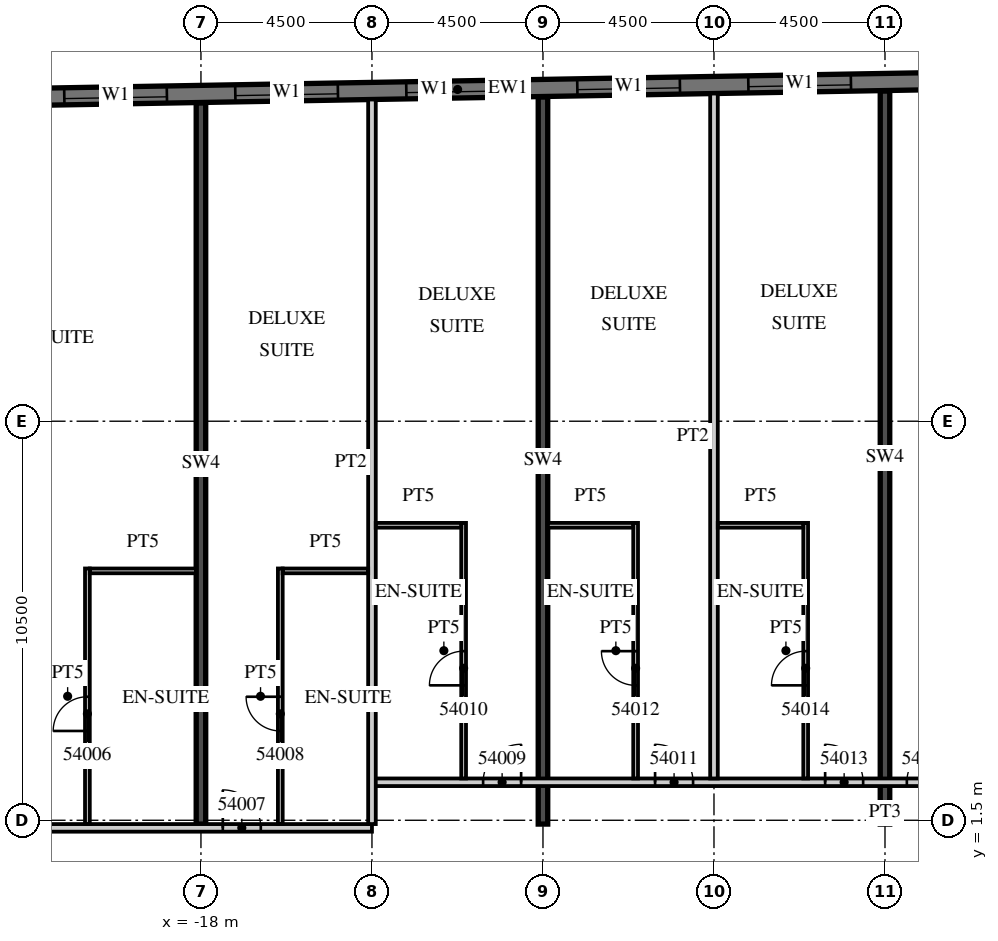
"""IFC4 building model, lengths in metres.
Left out: names, types, materials, properties, quantities, classifications, styles, units other than length and angle.
Written with IfcOpenShell. Run it as: python <this file> out.ifc"""

import sys

from ifc_helpers import new_model, si_unit, direction, frame, frame_2d, origin, place, context, subcontext, project, spatial, rectangle, extrude, element, fill, save


model = new_model("IFC4")
c1 = context("Model", 3, precision=1e-05, world=origin(), true_north=direction((0.0, 1.0)))
c2 = subcontext(c1, "Body", "Model", "MODEL_VIEW")
j1 = project(units=[si_unit("LENGTHUNIT", "METRE"), si_unit("PLANEANGLEUNIT", "RADIAN")], contexts=[c1])
p1 = place(None, origin())
s1 = spatial("IfcSite", under=j1, at=p1, CompositionType="ELEMENT")
p2 = place(p1, origin())
s2 = spatial("IfcBuilding", under=s1, at=p2, CompositionType="ELEMENT")
p3 = place(p2, frame((0.0, 0.0, 224.3)))
s3 = spatial("IfcBuildingStorey", under=s2, at=p3, CompositionType="ELEMENT", Elevation=224.3)
p4 = place(p3, frame((-18.0, 1.4, 0.0), z_axis=(0.0, 0.0, 1.0), x_axis=(0.0, 1.0, 0.0)))
e1 = element("IfcWall", 1, at=p4, inside=s3, PredefinedType="SHEAR", context=c2, shape_type="SweptSolid", body=[
    extrude(rectangle(XDim=18.974, YDim=0.25, at=frame_2d((9.487, 0.0))), origin(), (0.0, 0.0, 1.0), 3.3),
])
p5 = place(p3, frame((-9.0, 1.4, 0.0), z_axis=(0.0, 0.0, 1.0), x_axis=(0.0, 1.0, 0.0)))
e2 = element("IfcWall", 2, at=p5, inside=s3, PredefinedType="SHEAR", context=c2, shape_type="SweptSolid", body=[
    extrude(rectangle(XDim=19.132, YDim=0.25, at=frame_2d((9.566, 0.0))), origin(), (0.0, 0.0, 1.0), 3.3),
])
p6 = place(p3, frame((0.0, 1.4, 0.0), z_axis=(0.0, 0.0, 1.0), x_axis=(0.0, 1.0, 0.0)))
e3 = element("IfcWall", 3, at=p6, inside=s3, PredefinedType="SHEAR", context=c2, shape_type="SweptSolid", body=[
    extrude(rectangle(XDim=19.289, YDim=0.25, at=frame_2d((9.644, 0.0))), origin(), (0.0, 0.0, 1.0), 3.3),
])
p7 = place(p3, frame((13.504, 21.161, 0.0), z_axis=(0.0, 0.0, 1.0), x_axis=(-0.999847763257, -0.017448504532, 0.0)))
e4 = element("IfcWall", 4, at=p7, inside=s3, PredefinedType="SOLIDWALL", context=c2, shape_type="SweptSolid", body=[
    extrude(rectangle(XDim=46.859, YDim=0.45, at=frame_2d((23.43, 0.0))), origin(), (0.0, 0.0, 1.0), 3.02),
])
p8 = place(p7, frame((0.9, 0.0, 0.45)))
e5 = element("IfcOpeningElement", 5, at=p8, cuts=e4, PredefinedType="OPENING", context=c2, shape_type="SweptSolid", body=[
    extrude(rectangle(XDim=2.7, YDim=2.25, at=frame_2d((1.35, 1.125))), frame((0.0, 0.235, 0.0), z_axis=(0.0, -1.0, 0.0), x_axis=(1.0, 0.0, 0.0)), (0.0, 0.0, 1.0), 0.47),
])
p9 = place(p7, frame((5.401, 0.0, 0.45)))
e6 = element("IfcOpeningElement", 6, at=p9, cuts=e4, PredefinedType="OPENING", context=c2, shape_type="SweptSolid", body=[
    extrude(rectangle(XDim=2.7, YDim=2.25, at=frame_2d((1.35, 1.125))), frame((0.0, 0.235, 0.0), z_axis=(0.0, -1.0, 0.0), x_axis=(1.0, 0.0, 0.0)), (0.0, 0.0, 1.0), 0.47),
])
p10 = place(p7, frame((9.902, 0.0, 0.45)))
e7 = element("IfcOpeningElement", 7, at=p10, cuts=e4, PredefinedType="OPENING", context=c2, shape_type="SweptSolid", body=[
    extrude(rectangle(XDim=2.7, YDim=2.25, at=frame_2d((1.35, 1.125))), frame((0.0, 0.235, 0.0), z_axis=(0.0, -1.0, 0.0), x_axis=(1.0, 0.0, 0.0)), (0.0, 0.0, 1.0), 0.47),
])
p11 = place(p7, frame((14.402, 0.0, 0.45)))
e8 = element("IfcOpeningElement", 8, at=p11, cuts=e4, PredefinedType="OPENING", context=c2, shape_type="SweptSolid", body=[
    extrude(rectangle(XDim=2.7, YDim=2.25, at=frame_2d((1.35, 1.125))), frame((0.0, 0.235, 0.0), z_axis=(0.0, -1.0, 0.0), x_axis=(1.0, 0.0, 0.0)), (0.0, 0.0, 1.0), 0.47),
])
p12 = place(p7, frame((18.903, 0.0, 0.45)))
e9 = element("IfcOpeningElement", 9, at=p12, cuts=e4, PredefinedType="OPENING", context=c2, shape_type="SweptSolid", body=[
    extrude(rectangle(XDim=2.7, YDim=2.25, at=frame_2d((1.35, 1.125))), frame((0.0, 0.235, 0.0), z_axis=(0.0, -1.0, 0.0), x_axis=(1.0, 0.0, 0.0)), (0.0, 0.0, 1.0), 0.47),
])
p13 = place(p7, frame((23.404, 0.0, 0.45)))
e10 = element("IfcOpeningElement", 10, at=p13, cuts=e4, PredefinedType="OPENING", context=c2, shape_type="SweptSolid", body=[
    extrude(rectangle(XDim=2.7, YDim=2.25, at=frame_2d((1.35, 1.125))), frame((0.0, 0.235, 0.0), z_axis=(0.0, -1.0, 0.0), x_axis=(1.0, 0.0, 0.0)), (0.0, 0.0, 1.0), 0.47),
])
p14 = place(p7, frame((27.904, 0.0, 0.45)))
e11 = element("IfcOpeningElement", 11, at=p14, cuts=e4, PredefinedType="OPENING", context=c2, shape_type="SweptSolid", body=[
    extrude(rectangle(XDim=2.7, YDim=2.25, at=frame_2d((1.35, 1.125))), frame((0.0, 0.235, 0.0), z_axis=(0.0, -1.0, 0.0), x_axis=(1.0, 0.0, 0.0)), (0.0, 0.0, 1.0), 0.47),
])
p15 = place(p7, frame((32.405, 0.0, 0.45)))
e12 = element("IfcOpeningElement", 12, at=p15, cuts=e4, PredefinedType="OPENING", context=c2, shape_type="SweptSolid", body=[
    extrude(rectangle(XDim=2.7, YDim=2.25, at=frame_2d((1.35, 1.125))), frame((0.0, 0.235, 0.0), z_axis=(0.0, -1.0, 0.0), x_axis=(1.0, 0.0, 0.0)), (0.0, 0.0, 1.0), 0.47),
])
p16 = place(p7, frame((36.906, 0.0, 0.45)))
e13 = element("IfcOpeningElement", 13, at=p16, cuts=e4, PredefinedType="OPENING", context=c2, shape_type="SweptSolid", body=[
    extrude(rectangle(XDim=2.7, YDim=2.25, at=frame_2d((1.35, 1.125))), frame((0.0, 0.235, 0.0), z_axis=(0.0, -1.0, 0.0), x_axis=(1.0, 0.0, 0.0)), (0.0, 0.0, 1.0), 0.47),
])
p17 = place(p7, frame((41.406, 0.0, 0.45)))
e14 = element("IfcOpeningElement", 14, at=p17, cuts=e4, PredefinedType="OPENING", context=c2, shape_type="SweptSolid", body=[
    extrude(rectangle(XDim=2.7, YDim=2.25, at=frame_2d((1.35, 1.125))), frame((0.0, 0.235, 0.0), z_axis=(0.0, -1.0, 0.0), x_axis=(1.0, 0.0, 0.0)), (0.0, 0.0, 1.0), 0.47),
])
p18 = place(p3, frame((-36.566, 1.3, 0.0), z_axis=(0.0, 0.0, 1.0), x_axis=(1.0, 0.0, 0.0)))
e15 = element("IfcWall", 15, at=p18, inside=s3, PredefinedType="PARTITIONING", context=c2, shape_type="SweptSolid", body=[
    extrude(rectangle(XDim=23.066, YDim=0.2, at=frame_2d((11.533, 0.0))), origin(), (0.0, 0.0, 1.0), 3.02),
])
p19 = place(p18, frame((1.141, 0.0, 0.0)))
e16 = element("IfcOpeningElement", 16, at=p19, cuts=e15, PredefinedType="OPENING", context=c2, shape_type="SweptSolid", body=[
    extrude(rectangle(XDim=1.0, YDim=2.1, at=frame_2d((0.5, 1.05))), frame((0.0, 0.11, 0.0), z_axis=(0.0, -1.0, 0.0), x_axis=(1.0, 0.0, 0.0)), (0.0, 0.0, 1.0), 0.22),
])
p20 = place(p18, frame((7.991, 0.0, 0.0)))
e17 = element("IfcOpeningElement", 17, at=p20, cuts=e15, PredefinedType="OPENING", context=c2, shape_type="SweptSolid", body=[
    extrude(rectangle(XDim=1.0, YDim=2.1, at=frame_2d((0.5, 1.05))), frame((0.0, 0.11, 0.0), z_axis=(0.0, -1.0, 0.0), x_axis=(1.0, 0.0, 0.0)), (0.0, 0.0, 1.0), 0.22),
])
p21 = place(p18, frame((12.004, 0.0, 0.0)))
e18 = element("IfcOpeningElement", 18, at=p21, cuts=e15, PredefinedType="OPENING", context=c2, shape_type="SweptSolid", body=[
    extrude(rectangle(XDim=1.2, YDim=2.1, at=frame_2d((0.6, 1.05))), frame((0.0, 0.11, 0.0), z_axis=(0.0, -1.0, 0.0), x_axis=(1.0, 0.0, 0.0)), (0.0, 0.0, 1.0), 0.22),
])
p22 = place(p18, frame((19.141, 0.0, 0.0)))
e19 = element("IfcOpeningElement", 19, at=p22, cuts=e15, PredefinedType="OPENING", context=c2, shape_type="SweptSolid", body=[
    extrude(rectangle(XDim=1.0, YDim=2.1, at=frame_2d((0.5, 1.05))), frame((0.0, 0.11, 0.0), z_axis=(0.0, -1.0, 0.0), x_axis=(1.0, 0.0, 0.0)), (0.0, 0.0, 1.0), 0.22),
])
p23 = place(p3, frame((-13.5, 2.5, 0.0), z_axis=(0.0, 0.0, 1.0), x_axis=(1.0, 0.0, 0.0)))
e20 = element("IfcWall", 20, at=p23, inside=s3, PredefinedType="PARTITIONING", context=c2, shape_type="SweptSolid", body=[
    extrude(rectangle(XDim=27.0, YDim=0.2, at=frame_2d((13.5, 0.0))), origin(), (0.0, 0.0, 1.0), 3.02),
])
p24 = place(p23, frame((2.925, 0.0, 0.0)))
e21 = element("IfcOpeningElement", 21, at=p24, cuts=e20, PredefinedType="OPENING", context=c2, shape_type="SweptSolid", body=[
    extrude(rectangle(XDim=1.0, YDim=2.1, at=frame_2d((0.5, 1.05))), frame((0.0, 0.11, 0.0), z_axis=(0.0, -1.0, 0.0), x_axis=(1.0, 0.0, 0.0)), (0.0, 0.0, 1.0), 0.22),
])
p25 = place(p23, frame((7.45, 0.0, 0.0)))
e22 = element("IfcOpeningElement", 22, at=p25, cuts=e20, PredefinedType="OPENING", context=c2, shape_type="SweptSolid", body=[
    extrude(rectangle(XDim=1.0, YDim=2.1, at=frame_2d((0.5, 1.05))), frame((0.0, 0.11, 0.0), z_axis=(0.0, -1.0, 0.0), x_axis=(1.0, 0.0, 0.0)), (0.0, 0.0, 1.0), 0.22),
])
p26 = place(p23, frame((11.925, 0.0, 0.0)))
e23 = element("IfcOpeningElement", 23, at=p26, cuts=e20, PredefinedType="OPENING", context=c2, shape_type="SweptSolid", body=[
    extrude(rectangle(XDim=1.0, YDim=2.1, at=frame_2d((0.5, 1.05))), frame((0.0, 0.11, 0.0), z_axis=(0.0, -1.0, 0.0), x_axis=(1.0, 0.0, 0.0)), (0.0, 0.0, 1.0), 0.22),
])
p27 = place(p23, frame((14.075, 0.0, 0.0)))
e24 = element("IfcOpeningElement", 24, at=p27, cuts=e20, PredefinedType="OPENING", context=c2, shape_type="SweptSolid", body=[
    extrude(rectangle(XDim=1.0, YDim=2.1, at=frame_2d((0.5, 1.05))), frame((0.0, 0.11, 0.0), z_axis=(0.0, -1.0, 0.0), x_axis=(1.0, 0.0, 0.0)), (0.0, 0.0, 1.0), 0.22),
])
p28 = place(p23, frame((20.925, 0.0, 0.0)))
e25 = element("IfcOpeningElement", 25, at=p28, cuts=e20, PredefinedType="OPENING", context=c2, shape_type="SweptSolid", body=[
    extrude(rectangle(XDim=1.0, YDim=2.1, at=frame_2d((0.5, 1.05))), frame((0.0, 0.11, 0.0), z_axis=(0.0, -1.0, 0.0), x_axis=(1.0, 0.0, 0.0)), (0.0, 0.0, 1.0), 0.22),
])
p29 = place(p23, frame((25.425, 0.0, 0.0)))
e26 = element("IfcOpeningElement", 26, at=p29, cuts=e20, PredefinedType="OPENING", context=c2, shape_type="SweptSolid", body=[
    extrude(rectangle(XDim=1.0, YDim=2.1, at=frame_2d((0.5, 1.05))), frame((0.0, 0.11, 0.0), z_axis=(0.0, -1.0, 0.0), x_axis=(1.0, 0.0, 0.0)), (0.0, 0.0, 1.0), 0.22),
])
p30 = place(p3, frame((-20.988, 1.4, 0.0), z_axis=(0.0, 0.0, 1.0), x_axis=(0.0, 1.0, 0.0)))
e27 = element("IfcWall", 27, at=p30, inside=s3, PredefinedType="PARTITIONING", context=c2, shape_type="SweptSolid", body=[
    extrude(rectangle(XDim=6.725, YDim=0.125, at=frame_2d((3.363, 0.0))), origin(), (0.0, 0.0, 1.0), 3.02),
])
p31 = place(p30, frame((2.45, 0.0, 0.0)))
e28 = element("IfcOpeningElement", 28, at=p31, cuts=e27, PredefinedType="OPENING", context=c2, shape_type="SweptSolid", body=[
    extrude(rectangle(XDim=0.9, YDim=2.1, at=frame_2d((0.45, 1.05))), frame((0.0, 0.073, 0.0), z_axis=(0.0, -1.0, 0.0), x_axis=(1.0, 0.0, 0.0)), (0.0, 0.0, 1.0), 0.145),
])
p32 = place(p3, frame((-20.925, 8.062, 0.0), z_axis=(0.0, 0.0, 1.0), x_axis=(1.0, 0.0, 0.0)))
e29 = element("IfcWall", 29, at=p32, inside=s3, PredefinedType="PARTITIONING", context=c2, shape_type="SweptSolid", body=[
    extrude(rectangle(XDim=2.8, YDim=0.125, at=frame_2d((1.4, 0.0))), origin(), (0.0, 0.0, 1.0), 3.02),
])
p33 = place(p3, frame((-13.5, 1.4, 0.0), z_axis=(0.0, 0.0, 1.0), x_axis=(0.0, 1.0, 0.0)))
e30 = element("IfcWall", 30, at=p33, inside=s3, PredefinedType="PARTITIONING", context=c2, shape_type="SweptSolid", body=[
    extrude(rectangle(XDim=19.065, YDim=0.2, at=frame_2d((9.533, 0.0))), origin(), (0.0, 0.0, 1.0), 3.02),
])
p34 = place(p3, frame((-15.912, 1.4, 0.0), z_axis=(0.0, 0.0, 1.0), x_axis=(0.0, 1.0, 0.0)))
e31 = element("IfcWall", 31, at=p34, inside=s3, PredefinedType="PARTITIONING", context=c2, shape_type="SweptSolid", body=[
    extrude(rectangle(XDim=6.725, YDim=0.125, at=frame_2d((3.363, 0.0))), origin(), (0.0, 0.0, 1.0), 3.02),
])
p35 = place(p34, frame((2.45, 0.0, 0.0)))
e32 = element("IfcOpeningElement", 32, at=p35, cuts=e31, PredefinedType="OPENING", context=c2, shape_type="SweptSolid", body=[
    extrude(rectangle(XDim=0.9, YDim=2.1, at=frame_2d((0.45, 1.05))), frame((0.0, 0.073, 0.0), z_axis=(0.0, -1.0, 0.0), x_axis=(1.0, 0.0, 0.0)), (0.0, 0.0, 1.0), 0.145),
])
p36 = place(p3, frame((-15.85, 8.062, 0.0), z_axis=(0.0, 0.0, 1.0), x_axis=(1.0, 0.0, 0.0)))
e33 = element("IfcWall", 33, at=p36, inside=s3, PredefinedType="PARTITIONING", context=c2, shape_type="SweptSolid", body=[
    extrude(rectangle(XDim=2.25, YDim=0.125, at=frame_2d((1.125, 0.0))), origin(), (0.0, 0.0, 1.0), 3.02),
])
p37 = place(p3, frame((-11.088, 2.6, 0.0), z_axis=(0.0, 0.0, 1.0), x_axis=(0.0, 1.0, 0.0)))
e34 = element("IfcWall", 34, at=p37, inside=s3, PredefinedType="PARTITIONING", context=c2, shape_type="SweptSolid", body=[
    extrude(rectangle(XDim=6.725, YDim=0.125, at=frame_2d((3.362, 0.0))), origin(), (0.0, 0.0, 1.0), 3.02),
])
p38 = place(p37, frame((2.45, 0.0, 0.0)))
e35 = element("IfcOpeningElement", 35, at=p38, cuts=e34, PredefinedType="OPENING", context=c2, shape_type="SweptSolid", body=[
    extrude(rectangle(XDim=0.9, YDim=2.1, at=frame_2d((0.45, 1.05))), frame((0.0, 0.073, 0.0), z_axis=(0.0, -1.0, 0.0), x_axis=(1.0, 0.0, 0.0)), (0.0, 0.0, 1.0), 0.145),
])
p39 = place(p3, frame((-13.4, 9.262, 0.0), z_axis=(0.0, 0.0, 1.0), x_axis=(1.0, 0.0, 0.0)))
e36 = element("IfcWall", 36, at=p39, inside=s3, PredefinedType="PARTITIONING", context=c2, shape_type="SweptSolid", body=[
    extrude(rectangle(XDim=2.25, YDim=0.125, at=frame_2d((1.125, 0.0))), origin(), (0.0, 0.0, 1.0), 3.02),
])
p40 = place(p3, frame((-4.5, 2.6, 0.0), z_axis=(0.0, 0.0, 1.0), x_axis=(0.0, 1.0, 0.0)))
e37 = element("IfcWall", 37, at=p40, inside=s3, PredefinedType="PARTITIONING", context=c2, shape_type="SweptSolid", body=[
    extrude(rectangle(XDim=18.022, YDim=0.2, at=frame_2d((9.011, 0.0))), origin(), (0.0, 0.0, 1.0), 3.02),
])
p41 = place(p3, frame((-6.562, 2.6, 0.0), z_axis=(0.0, 0.0, 1.0), x_axis=(0.0, 1.0, 0.0)))
e38 = element("IfcWall", 38, at=p41, inside=s3, PredefinedType="PARTITIONING", context=c2, shape_type="SweptSolid", body=[
    extrude(rectangle(XDim=6.725, YDim=0.125, at=frame_2d((3.362, 0.0))), origin(), (0.0, 0.0, 1.0), 3.02),
])
p42 = place(p41, frame((2.45, 0.0, 0.0)))
e39 = element("IfcOpeningElement", 39, at=p42, cuts=e38, PredefinedType="OPENING", context=c2, shape_type="SweptSolid", body=[
    extrude(rectangle(XDim=0.9, YDim=2.1, at=frame_2d((0.45, 1.05))), frame((0.0, 0.073, 0.0), z_axis=(0.0, -1.0, 0.0), x_axis=(1.0, 0.0, 0.0)), (0.0, 0.0, 1.0), 0.145),
])
p43 = place(p3, frame((-8.875, 9.262, 0.0), z_axis=(0.0, 0.0, 1.0), x_axis=(1.0, 0.0, 0.0)))
e40 = element("IfcWall", 40, at=p43, inside=s3, PredefinedType="PARTITIONING", context=c2, shape_type="SweptSolid", body=[
    extrude(rectangle(XDim=2.25, YDim=0.125, at=frame_2d((1.125, 0.0))), origin(), (0.0, 0.0, 1.0), 3.02),
])
p44 = place(p3, frame((-2.087, 2.6, 0.0), z_axis=(0.0, 0.0, 1.0), x_axis=(0.0, 1.0, 0.0)))
e41 = element("IfcWall", 41, at=p44, inside=s3, PredefinedType="PARTITIONING", context=c2, shape_type="SweptSolid", body=[
    extrude(rectangle(XDim=6.725, YDim=0.125, at=frame_2d((3.362, 0.0))), origin(), (0.0, 0.0, 1.0), 3.02),
])
p45 = place(p44, frame((2.45, 0.0, 0.0)))
e42 = element("IfcOpeningElement", 42, at=p45, cuts=e41, PredefinedType="OPENING", context=c2, shape_type="SweptSolid", body=[
    extrude(rectangle(XDim=0.9, YDim=2.1, at=frame_2d((0.45, 1.05))), frame((0.0, 0.073, 0.0), z_axis=(0.0, -1.0, 0.0), x_axis=(1.0, 0.0, 0.0)), (0.0, 0.0, 1.0), 0.145),
])
p46 = place(p3, frame((-4.4, 9.262, 0.0), z_axis=(0.0, 0.0, 1.0), x_axis=(1.0, 0.0, 0.0)))
e43 = element("IfcWall", 43, at=p46, inside=s3, PredefinedType="PARTITIONING", context=c2, shape_type="SweptSolid", body=[
    extrude(rectangle(XDim=2.25, YDim=0.125, at=frame_2d((1.125, 0.0))), origin(), (0.0, 0.0, 1.0), 3.02),
])
p47 = place(p11, origin())
e44 = element("IfcWindow", 44, at=p47, inside=s3, PartitioningType="SINGLE_PANEL", PredefinedType="WINDOW", context=c2, shape_type="SweptSolid", body=[
    extrude(rectangle(XDim=2.7, YDim=2.25, at=frame_2d((1.35, 1.125))), frame((0.0, 0.09, 0.0), z_axis=(0.0, -1.0, 0.0), x_axis=(1.0, 0.0, 0.0)), (0.0, 0.0, 1.0), 0.06),
])
fill(e8, e44)
p48 = place(p12, origin())
e45 = element("IfcWindow", 45, at=p48, inside=s3, PartitioningType="SINGLE_PANEL", PredefinedType="WINDOW", context=c2, shape_type="SweptSolid", body=[
    extrude(rectangle(XDim=2.7, YDim=2.25, at=frame_2d((1.35, 1.125))), frame((0.0, 0.09, 0.0), z_axis=(0.0, -1.0, 0.0), x_axis=(1.0, 0.0, 0.0)), (0.0, 0.0, 1.0), 0.06),
])
fill(e9, e45)
p49 = place(p13, origin())
e46 = element("IfcWindow", 46, at=p49, inside=s3, PartitioningType="SINGLE_PANEL", PredefinedType="WINDOW", context=c2, shape_type="SweptSolid", body=[
    extrude(rectangle(XDim=2.7, YDim=2.25, at=frame_2d((1.35, 1.125))), frame((0.0, 0.09, 0.0), z_axis=(0.0, -1.0, 0.0), x_axis=(1.0, 0.0, 0.0)), (0.0, 0.0, 1.0), 0.06),
])
fill(e10, e46)
p50 = place(p14, origin())
e47 = element("IfcWindow", 47, at=p50, inside=s3, PartitioningType="SINGLE_PANEL", PredefinedType="WINDOW", context=c2, shape_type="SweptSolid", body=[
    extrude(rectangle(XDim=2.7, YDim=2.25, at=frame_2d((1.35, 1.125))), frame((0.0, 0.09, 0.0), z_axis=(0.0, -1.0, 0.0), x_axis=(1.0, 0.0, 0.0)), (0.0, 0.0, 1.0), 0.06),
])
fill(e11, e47)
p51 = place(p15, origin())
e48 = element("IfcWindow", 48, at=p51, inside=s3, PartitioningType="SINGLE_PANEL", PredefinedType="WINDOW", context=c2, shape_type="SweptSolid", body=[
    extrude(rectangle(XDim=2.7, YDim=2.25, at=frame_2d((1.35, 1.125))), frame((0.0, 0.09, 0.0), z_axis=(0.0, -1.0, 0.0), x_axis=(1.0, 0.0, 0.0)), (0.0, 0.0, 1.0), 0.06),
])
fill(e12, e48)
p52 = place(p31, origin())
e49 = element("IfcDoor", 49, at=p52, inside=s3, OperationType="SINGLE_SWING_LEFT", PredefinedType="DOOR", context=c2, shape_type="SweptSolid", body=[
    extrude(rectangle(XDim=0.9, YDim=2.1, at=frame_2d((0.45, 1.05))), frame((0.0, 0.025, 0.0), z_axis=(0.0, -1.0, 0.0), x_axis=(1.0, 0.0, 0.0)), (0.0, 0.0, 1.0), 0.05),
])
fill(e28, e49)
p53 = place(p22, origin())
e50 = element("IfcDoor", 50, at=p53, inside=s3, OperationType="SINGLE_SWING_LEFT", PredefinedType="DOOR", context=c2, shape_type="SweptSolid", body=[
    extrude(rectangle(XDim=1.0, YDim=2.1, at=frame_2d((0.5, 1.05))), frame((0.0, 0.025, 0.0), z_axis=(0.0, -1.0, 0.0), x_axis=(1.0, 0.0, 0.0)), (0.0, 0.0, 1.0), 0.05),
])
fill(e19, e50)
p54 = place(p35, origin())
e51 = element("IfcDoor", 51, at=p54, inside=s3, OperationType="SINGLE_SWING_RIGHT", PredefinedType="DOOR", context=c2, shape_type="SweptSolid", body=[
    extrude(rectangle(XDim=0.9, YDim=2.1, at=frame_2d((0.45, 1.05))), frame((0.0, 0.025, 0.0), z_axis=(0.0, -1.0, 0.0), x_axis=(1.0, 0.0, 0.0)), (0.0, 0.0, 1.0), 0.05),
])
fill(e32, e51)
p55 = place(p24, origin())
e52 = element("IfcDoor", 52, at=p55, inside=s3, OperationType="SINGLE_SWING_RIGHT", PredefinedType="DOOR", context=c2, shape_type="SweptSolid", body=[
    extrude(rectangle(XDim=1.0, YDim=2.1, at=frame_2d((0.5, 1.05))), frame((0.0, 0.025, 0.0), z_axis=(0.0, -1.0, 0.0), x_axis=(1.0, 0.0, 0.0)), (0.0, 0.0, 1.0), 0.05),
])
fill(e21, e52)
p56 = place(p38, origin())
e53 = element("IfcDoor", 53, at=p56, inside=s3, OperationType="SINGLE_SWING_LEFT", PredefinedType="DOOR", context=c2, shape_type="SweptSolid", body=[
    extrude(rectangle(XDim=0.9, YDim=2.1, at=frame_2d((0.45, 1.05))), frame((0.0, 0.025, 0.0), z_axis=(0.0, -1.0, 0.0), x_axis=(1.0, 0.0, 0.0)), (0.0, 0.0, 1.0), 0.05),
])
fill(e35, e53)
p57 = place(p25, origin())
e54 = element("IfcDoor", 54, at=p57, inside=s3, OperationType="SINGLE_SWING_LEFT", PredefinedType="DOOR", context=c2, shape_type="SweptSolid", body=[
    extrude(rectangle(XDim=1.0, YDim=2.1, at=frame_2d((0.5, 1.05))), frame((0.0, 0.025, 0.0), z_axis=(0.0, -1.0, 0.0), x_axis=(1.0, 0.0, 0.0)), (0.0, 0.0, 1.0), 0.05),
])
fill(e22, e54)
p58 = place(p42, origin())
e55 = element("IfcDoor", 55, at=p58, inside=s3, OperationType="SINGLE_SWING_RIGHT", PredefinedType="DOOR", context=c2, shape_type="SweptSolid", body=[
    extrude(rectangle(XDim=0.9, YDim=2.1, at=frame_2d((0.45, 1.05))), frame((0.0, 0.025, 0.0), z_axis=(0.0, -1.0, 0.0), x_axis=(1.0, 0.0, 0.0)), (0.0, 0.0, 1.0), 0.05),
])
fill(e39, e55)
p59 = place(p26, origin())
e56 = element("IfcDoor", 56, at=p59, inside=s3, OperationType="SINGLE_SWING_LEFT", PredefinedType="DOOR", context=c2, shape_type="SweptSolid", body=[
    extrude(rectangle(XDim=1.0, YDim=2.1, at=frame_2d((0.5, 1.05))), frame((0.0, 0.025, 0.0), z_axis=(0.0, -1.0, 0.0), x_axis=(1.0, 0.0, 0.0)), (0.0, 0.0, 1.0), 0.05),
])
fill(e23, e56)
p60 = place(p45, origin())
e57 = element("IfcDoor", 57, at=p60, inside=s3, OperationType="SINGLE_SWING_LEFT", PredefinedType="DOOR", context=c2, shape_type="SweptSolid", body=[
    extrude(rectangle(XDim=0.9, YDim=2.1, at=frame_2d((0.45, 1.05))), frame((0.0, 0.025, 0.0), z_axis=(0.0, -1.0, 0.0), x_axis=(1.0, 0.0, 0.0)), (0.0, 0.0, 1.0), 0.05),
])
fill(e42, e57)
p61 = place(p27, origin())
e58 = element("IfcDoor", 58, at=p61, inside=s3, OperationType="SINGLE_SWING_RIGHT", PredefinedType="DOOR", context=c2, shape_type="SweptSolid", body=[
    extrude(rectangle(XDim=1.0, YDim=2.1, at=frame_2d((0.5, 1.05))), frame((0.0, 0.025, 0.0), z_axis=(0.0, -1.0, 0.0), x_axis=(1.0, 0.0, 0.0)), (0.0, 0.0, 1.0), 0.05),
])
fill(e24, e58)
save(model, sys.argv[1])
